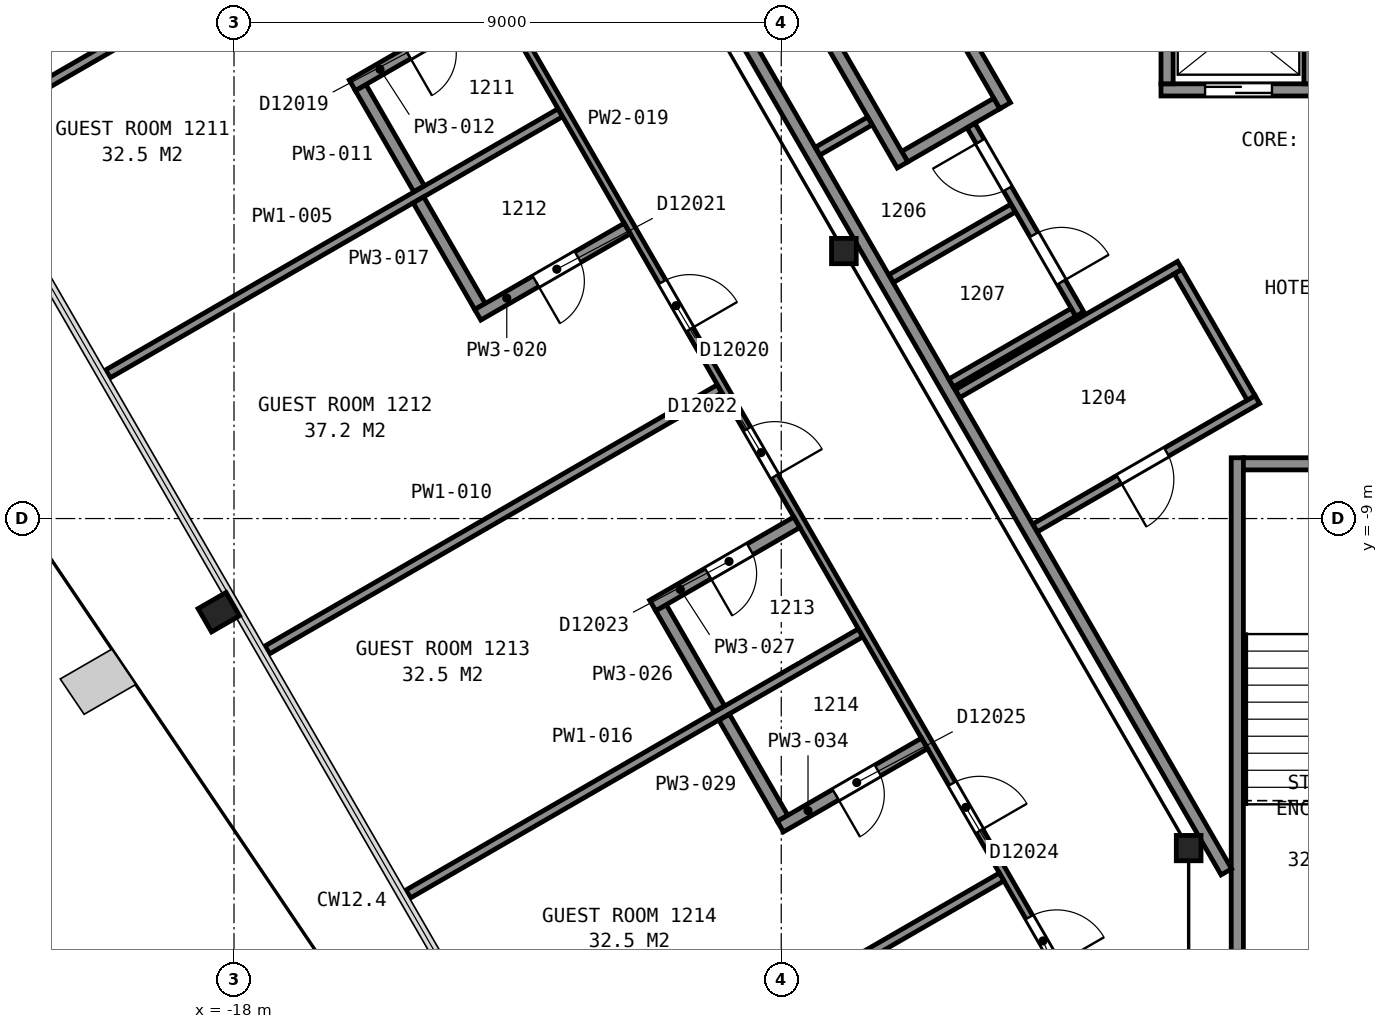
"""IFC4 building model, lengths in metres.
Left out: names, types, materials, properties, quantities, classifications, styles, units other than length and angle.
Written with IfcOpenShell. Run it as: python <this file> out.ifc"""

import sys

from ifc_helpers import new_model, si_unit, direction, frame, frame_2d, origin, origin_2d, place, context, subcontext, project, spatial, rectangle, i_section, extrude, element, fill, save


model = new_model("IFC4")
c1 = context("Model", 3, precision=1e-05, world=origin(), true_north=direction((0.0, 1.0)))
c2 = subcontext(c1, "Body", "Model", "MODEL_VIEW")
j1 = project(units=[si_unit("LENGTHUNIT", "METRE"), si_unit("PLANEANGLEUNIT", "RADIAN")], contexts=[c1])
p1 = place(None, origin())
s1 = spatial("IfcSite", under=j1, at=p1, CompositionType="ELEMENT")
p2 = place(p1, origin())
s2 = spatial("IfcBuilding", under=s1, at=p2, CompositionType="ELEMENT")
p3 = place(p2, frame((0.0, 0.0, 58.4)))
s3 = spatial("IfcBuildingStorey", under=s2, at=p3, CompositionType="ELEMENT", Elevation=58.4)
p4 = place(p3, frame((-18.25, -10.54, 0.0), z_axis=(0.0, 0.0, 1.0), x_axis=(-0.5, 0.866025403784, 0.0)))
e1 = element("IfcColumn", 1, at=p4, inside=s3, PredefinedType="COLUMN", context=c2, shape_type="SweptSolid", body=[
    extrude(i_section(OverallWidth=0.442, OverallDepth=0.531, WebThickness=0.066, FlangeThickness=0.106, FilletRadius=0.015, at=origin_2d()), origin(), (0.0, 0.0, 1.0), 3.575),
])
for number, where, z_axis, x_axis in (
    (2, (-7.97, -4.6, 0.0), (0.0, 0.0, 1.0), (1.0, 0.0, 0.0)),
    (3, (-2.3, -14.42, 0.0), (0.0, 0.0, 1.0), (1.0, 0.0, 0.0)),
):
    element("IfcColumn", number, at=place(p3, frame(where, z_axis=z_axis, x_axis=x_axis)), inside=s3, PredefinedType="COLUMN", context=c2, shape_type="SweptSolid", body=[
        extrude(i_section(OverallWidth=0.406, OverallDepth=0.417, WebThickness=0.03, FlangeThickness=0.048, FilletRadius=0.015, at=origin_2d()), origin(), (0.0, 0.0, 1.0), 3.6),
    ])
p5 = place(p3, frame((-1.5, -8.0, 0.0), z_axis=(0.0, 0.0, 1.0), x_axis=(0.0, -1.0, 0.0)))
e4 = element("IfcWall", 4, at=p5, inside=s3, PredefinedType="PARTITIONING", context=c2, shape_type="SweptSolid", body=[
    extrude(rectangle(XDim=12.0, YDim=0.2, at=frame_2d((6.0, 0.0))), origin(), (0.0, 0.0, 1.0), 3.35),
])
p6 = place(p3, frame((-1.4, -8.1, 0.0), z_axis=(0.0, 0.0, 1.0), x_axis=(1.0, 0.0, 0.0)))
e5 = element("IfcWall", 5, at=p6, inside=s3, PredefinedType="PARTITIONING", context=c2, shape_type="SweptSolid", body=[
    extrude(rectangle(XDim=2.8, YDim=0.2, at=frame_2d((1.4, 0.0))), origin(), (0.0, 0.0, 1.0), 3.35),
])
p7 = place(p3, frame((-2.755, -1.95, 0.0), z_axis=(0.0, 0.0, 1.0), x_axis=(1.0, 0.0, 0.0)))
e6 = element("IfcWall", 6, at=p7, inside=s3, PredefinedType="PARTITIONING", context=c2, shape_type="SweptSolid", body=[
    extrude(rectangle(XDim=2.55, YDim=0.2, at=frame_2d((1.275, 0.0))), origin(), (0.0, 0.0, 1.0), 3.6),
])
p8 = place(p7, frame((0.725, 0.0, 0.0)))
e7 = element("IfcOpeningElement", 7, at=p8, cuts=e6, PredefinedType="OPENING", context=c2, shape_type="SweptSolid", body=[
    extrude(rectangle(XDim=1.1, YDim=2.1, at=frame_2d((0.55, 1.05))), frame((0.0, 0.11, 0.0), z_axis=(0.0, -1.0, 0.0), x_axis=(1.0, 0.0, 0.0)), (0.0, 0.0, 1.0), 0.22),
])
for number, where, z_axis, x_axis in (
    (8, (-6.97, -3.048, 0.0), (0.0, 0.0, 1.0), (0.866, 0.5, 0.0)),
    (9, (-0.305, -1.85, 0.0), (0.0, 0.0, 1.0), (0.0, 1.0, 0.0)),
    (10, (-2.655, -1.85, 0.0), (0.0, 0.0, 1.0), (0.0, 1.0, 0.0)),
):
    element("IfcWall", number, at=place(p3, frame(where, z_axis=z_axis, x_axis=x_axis)), inside=s3, PredefinedType="PARTITIONING", context=c2, shape_type="SweptSolid", body=[
        extrude(rectangle(XDim=1.75, YDim=0.2, at=frame_2d((0.875, 0.0))), origin(), (0.0, 0.0, 1.0), 3.6),
    ])
p9 = place(p3, frame((-5.318, -2.21, 0.0), z_axis=(0.0, 0.0, 1.0), x_axis=(-0.499938297808, 0.866061024631, 0.0)))
e11 = element("IfcWall", 11, at=p9, inside=s3, PredefinedType="PARTITIONING", context=c2, shape_type="SweptSolid", body=[
    extrude(rectangle(XDim=2.35, YDim=0.2, at=frame_2d((1.175, 0.0))), origin(), (0.0, 0.0, 1.0), 3.6),
])
p10 = place(p3, frame((-7.006, -3.185, 0.0), z_axis=(0.0, 0.0, 1.0), x_axis=(-0.499990435942, 0.866030925526, 0.0)))
e12 = element("IfcWall", 12, at=p10, inside=s3, PredefinedType="PARTITIONING", context=c2, shape_type="SweptSolid", body=[
    extrude(rectangle(XDim=2.55, YDim=0.2, at=frame_2d((1.275, 0.0))), origin(), (0.0, 0.0, 1.0), 3.6),
])
p11 = place(p3, frame((-13.664, 5.946, 0.0), z_axis=(0.0, 0.0, 1.0), x_axis=(0.499994327219, -0.866028678941, 0.0)))
e13 = element("IfcWall", 13, at=p11, inside=s3, PredefinedType="PARTITIONING", context=c2, shape_type="SweptSolid", body=[
    extrude(rectangle(XDim=23.968, YDim=0.2, at=frame_2d((11.984, 0.0))), origin(), (0.0, 0.0, 1.0), 3.35),
])
p12 = place(p3, frame((-8.402, -2.958, 0.0), z_axis=(0.0, 0.0, 1.0), x_axis=(0.866025935826, 0.499999078476, 0.0)))
e14 = element("IfcWall", 14, at=p12, inside=s3, PredefinedType="PARTITIONING", context=c2, shape_type="SweptSolid", body=[
    extrude(rectangle(XDim=0.993, YDim=0.15, at=frame_2d((0.497, 0.0))), origin(), (0.0, 0.0, 1.0), 3.35),
])
p13 = place(p3, frame((-7.192, -5.053, 0.0), z_axis=(0.0, 0.0, 1.0), x_axis=(0.865851878631, 0.500300434011, 0.0)))
e15 = element("IfcWall", 15, at=p13, inside=s3, PredefinedType="PARTITIONING", context=c2, shape_type="SweptSolid", body=[
    extrude(rectangle(XDim=2.315, YDim=0.15, at=frame_2d((1.158, 0.0))), origin(), (0.0, 0.0, 1.0), 3.35),
])
p14 = place(p3, frame((-6.206, -6.77, 0.0), z_axis=(0.0, 0.0, 1.0), x_axis=(0.865998469481, 0.500046648681, 0.0)))
e16 = element("IfcWall", 16, at=p14, inside=s3, PredefinedType="PARTITIONING", context=c2, shape_type="SweptSolid", body=[
    extrude(rectangle(XDim=2.325, YDim=0.15, at=frame_2d((1.163, 0.0))), origin(), (0.0, 0.0, 1.0), 3.35),
])
p15 = place(p3, frame((-6.1, -6.946, 0.0), z_axis=(0.0, 0.0, 1.0), x_axis=(0.866038200431, 0.499977834903, 0.0)))
e17 = element("IfcWall", 17, at=p15, inside=s3, PredefinedType="PARTITIONING", context=c2, shape_type="SweptSolid", body=[
    extrude(rectangle(XDim=4.22, YDim=0.15, at=frame_2d((2.11, 0.0))), origin(), (0.0, 0.0, 1.0), 3.35),
])
p16 = place(p3, frame((-4.091, -5.635, 0.0), z_axis=(0.0, 0.0, 1.0), x_axis=(-0.499948934428, 0.866054884499, 0.0)))
e18 = element("IfcWall", 18, at=p16, inside=s3, PredefinedType="PARTITIONING", context=c2, shape_type="SweptSolid", body=[
    extrude(rectangle(XDim=3.577, YDim=0.15, at=frame_2d((1.789, 0.0))), origin(), (0.0, 0.0, 1.0), 3.35),
])
p17 = place(p16, frame((2.377, 0.0, 0.0)))
e19 = element("IfcOpeningElement", 19, at=p17, cuts=e18, PredefinedType="OPENING", context=c2, shape_type="SweptSolid", body=[
    extrude(rectangle(XDim=0.9, YDim=2.1, at=frame_2d((0.45, 1.05))), frame((0.0, 0.085, 0.0), z_axis=(0.0, -1.0, 0.0), x_axis=(1.0, 0.0, 0.0)), (0.0, 0.0, 1.0), 0.17),
])
p18 = place(p16, frame((0.605, 0.0, 0.0)))
e20 = element("IfcOpeningElement", 20, at=p18, cuts=e18, PredefinedType="OPENING", context=c2, shape_type="SweptSolid", body=[
    extrude(rectangle(XDim=0.9, YDim=2.1, at=frame_2d((0.45, 1.05))), frame((0.0, 0.085, 0.0), z_axis=(0.0, -1.0, 0.0), x_axis=(1.0, 0.0, 0.0)), (0.0, 0.0, 1.0), 0.17),
])
p19 = place(p3, frame((-4.825, -9.154, 0.0), z_axis=(0.0, 0.0, 1.0), x_axis=(0.866023738697, 0.500002884005, 0.0)))
e21 = element("IfcWall", 21, at=p19, inside=s3, PredefinedType="PARTITIONING", context=c2, shape_type="SweptSolid", body=[
    extrude(rectangle(XDim=4.22, YDim=0.15, at=frame_2d((2.11, 0.0))), origin(), (0.0, 0.0, 1.0), 3.35),
])
p20 = place(p19, frame((1.595, 0.0, 0.0)))
e22 = element("IfcOpeningElement", 22, at=p20, cuts=e21, PredefinedType="OPENING", context=c2, shape_type="SweptSolid", body=[
    extrude(rectangle(XDim=0.9, YDim=2.1, at=frame_2d((0.45, 1.05))), frame((0.0, 0.085, 0.0), z_axis=(0.0, -1.0, 0.0), x_axis=(1.0, 0.0, 0.0)), (0.0, 0.0, 1.0), 0.17),
])
p21 = place(p3, frame((-2.472, -4.938, 0.0), z_axis=(0.0, 0.0, 1.0), x_axis=(0.500045362686, -0.865999212041, 0.0)))
e23 = element("IfcWall", 23, at=p21, inside=s3, PredefinedType="PARTITIONING", context=c2, shape_type="SweptSolid", body=[
    extrude(rectangle(XDim=2.4, YDim=0.15, at=frame_2d((1.2, 0.0))), origin(), (0.0, 0.0, 1.0), 3.35),
])
p22 = place(p3, frame((-22.392, -2.605, 0.0), z_axis=(0.0, 0.0, 1.0), x_axis=(0.866031705461, 0.499989085017, 0.0)))
e24 = element("IfcWall", 24, at=p22, inside=s3, PredefinedType="PARTITIONING", context=c2, shape_type="SweptSolid", body=[
    extrude(rectangle(XDim=8.587, YDim=0.15, at=frame_2d((4.293, 0.0))), origin(), (0.0, 0.0, 1.0), 2.613),
])
p23 = place(p3, frame((-20.073, -6.621, 0.0), z_axis=(0.0, 0.0, 1.0), x_axis=(0.866029425019, 0.499993034952, 0.0)))
e25 = element("IfcWall", 25, at=p23, inside=s3, PredefinedType="PARTITIONING", context=c2, shape_type="SweptSolid", body=[
    extrude(rectangle(XDim=8.591, YDim=0.15, at=frame_2d((4.296, 0.0))), origin(), (0.0, 0.0, 1.0), 2.613),
])
p24 = place(p3, frame((-17.453, -11.16, 0.0), z_axis=(0.0, 0.0, 1.0), x_axis=(0.866031705461, 0.499989085017, 0.0)))
e26 = element("IfcWall", 26, at=p24, inside=s3, PredefinedType="PARTITIONING", context=c2, shape_type="SweptSolid", body=[
    extrude(rectangle(XDim=8.587, YDim=0.15, at=frame_2d((4.293, 0.0))), origin(), (0.0, 0.0, 1.0), 2.613),
])
p25 = place(p3, frame((-15.917, -1.912, 0.0), z_axis=(0.0, 0.0, 1.0), x_axis=(0.499913221443, -0.866075499611, 0.0)))
e27 = element("IfcWall", 27, at=p25, inside=s3, PredefinedType="PARTITIONING", context=c2, shape_type="SweptSolid", body=[
    extrude(rectangle(XDim=1.92, YDim=0.2, at=frame_2d((0.96, 0.0))), origin(), (0.0, 0.0, 1.0), 2.613),
])
p26 = place(p3, frame((-13.688, -0.509, 0.0), z_axis=(0.0, 0.0, 1.0), x_axis=(-0.866012976267, -0.500021524473, 0.0)))
e28 = element("IfcWall", 28, at=p26, inside=s3, PredefinedType="PARTITIONING", context=c2, shape_type="SweptSolid", body=[
    extrude(rectangle(XDim=2.732, YDim=0.2, at=frame_2d((1.366, 0.0))), origin(), (0.0, 0.0, 1.0), 2.613),
])
p27 = place(p26, frame((0.882, 0.0, 0.0)))
e29 = element("IfcOpeningElement", 29, at=p27, cuts=e28, PredefinedType="OPENING", context=c2, shape_type="SweptSolid", body=[
    extrude(rectangle(XDim=0.8, YDim=2.1, at=frame_2d((0.4, 1.05))), frame((0.0, 0.11, 0.0), z_axis=(0.0, -1.0, 0.0), x_axis=(1.0, 0.0, 0.0)), (0.0, 0.0, 1.0), 0.22),
])
p28 = place(p3, frame((-15.135, -15.175, 0.0), z_axis=(0.0, 0.0, 1.0), x_axis=(0.866024224461, 0.500002042643, 0.0)))
e30 = element("IfcWall", 30, at=p28, inside=s3, PredefinedType="PARTITIONING", context=c2, shape_type="SweptSolid", body=[
    extrude(rectangle(XDim=8.592, YDim=0.15, at=frame_2d((4.296, 0.0))), origin(), (0.0, 0.0, 1.0), 2.613),
])
p29 = place(p3, frame((-14.967, -3.759, 0.0), z_axis=(0.0, 0.0, 1.0), x_axis=(0.500042536776, -0.866000843773, 0.0)))
e31 = element("IfcWall", 31, at=p29, inside=s3, PredefinedType="PARTITIONING", context=c2, shape_type="SweptSolid", body=[
    extrude(rectangle(XDim=2.025, YDim=0.2, at=frame_2d((1.012, 0.0))), origin(), (0.0, 0.0, 1.0), 2.613),
])
p30 = place(p3, frame((-3.766, -17.558, 0.0), z_axis=(0.0, 0.0, 1.0), x_axis=(-0.500008349927, 0.866020582898, 0.0)))
e32 = element("IfcWall", 32, at=p30, inside=s3, PredefinedType="PARTITIONING", context=c2, shape_type="SweptSolid", body=[
    extrude(rectangle(XDim=22.496, YDim=0.125, at=frame_2d((11.248, 0.0))), origin(), (0.0, 0.0, 1.0), 2.613),
])
p31 = place(p30, frame((20.563, 0.0, 0.0)))
e33 = element("IfcOpeningElement", 33, at=p31, cuts=e32, PredefinedType="OPENING", context=c2, shape_type="SweptSolid", body=[
    extrude(rectangle(XDim=0.9, YDim=2.1, at=frame_2d((0.45, 1.05))), frame((0.0, 0.073, 0.0), z_axis=(0.0, -1.0, 0.0), x_axis=(1.0, 0.0, 0.0)), (0.0, 0.0, 1.0), 0.145),
])
p32 = place(p30, frame((13.476, 0.0, 0.0)))
e34 = element("IfcOpeningElement", 34, at=p32, cuts=e32, PredefinedType="OPENING", context=c2, shape_type="SweptSolid", body=[
    extrude(rectangle(XDim=0.9, YDim=2.1, at=frame_2d((0.45, 1.05))), frame((0.0, 0.073, 0.0), z_axis=(0.0, -1.0, 0.0), x_axis=(1.0, 0.0, 0.0)), (0.0, 0.0, 1.0), 0.145),
])
p33 = place(p30, frame((10.684, 0.0, 0.0)))
e35 = element("IfcOpeningElement", 35, at=p33, cuts=e32, PredefinedType="OPENING", context=c2, shape_type="SweptSolid", body=[
    extrude(rectangle(XDim=0.9, YDim=2.1, at=frame_2d((0.45, 1.05))), frame((0.0, 0.073, 0.0), z_axis=(0.0, -1.0, 0.0), x_axis=(1.0, 0.0, 0.0)), (0.0, 0.0, 1.0), 0.145),
])
p34 = place(p30, frame((3.948, 0.0, 0.0)))
e36 = element("IfcOpeningElement", 36, at=p34, cuts=e32, PredefinedType="OPENING", context=c2, shape_type="SweptSolid", body=[
    extrude(rectangle(XDim=0.9, YDim=2.1, at=frame_2d((0.45, 1.05))), frame((0.0, 0.073, 0.0), z_axis=(0.0, -1.0, 0.0), x_axis=(1.0, 0.0, 0.0)), (0.0, 0.0, 1.0), 0.145),
])
p35 = place(p30, frame((1.411, 0.0, 0.0)))
e37 = element("IfcOpeningElement", 37, at=p35, cuts=e32, PredefinedType="OPENING", context=c2, shape_type="SweptSolid", body=[
    extrude(rectangle(XDim=0.9, YDim=2.1, at=frame_2d((0.45, 1.05))), frame((0.0, 0.073, 0.0), z_axis=(0.0, -1.0, 0.0), x_axis=(1.0, 0.0, 0.0)), (0.0, 0.0, 1.0), 0.145),
])
p36 = place(p3, frame((-13.991, -5.649, 0.0), z_axis=(0.0, 0.0, 1.0), x_axis=(0.866048046904, 0.499960778915, 0.0)))
e38 = element("IfcWall", 38, at=p36, inside=s3, PredefinedType="PARTITIONING", context=c2, shape_type="SweptSolid", body=[
    extrude(rectangle(XDim=2.838, YDim=0.2, at=frame_2d((1.419, 0.0))), origin(), (0.0, 0.0, 1.0), 2.613),
])
p37 = place(p36, frame((1.1, 0.0, 0.0)))
e39 = element("IfcOpeningElement", 39, at=p37, cuts=e38, PredefinedType="OPENING", context=c2, shape_type="SweptSolid", body=[
    extrude(rectangle(XDim=0.8, YDim=2.1, at=frame_2d((0.4, 1.05))), frame((0.0, 0.11, 0.0), z_axis=(0.0, -1.0, 0.0), x_axis=(1.0, 0.0, 0.0)), (0.0, 0.0, 1.0), 0.22),
])
p38 = place(p3, frame((-12.816, -19.191, 0.0), z_axis=(0.0, 0.0, 1.0), x_axis=(0.866034625887, 0.499984026509, 0.0)))
e40 = element("IfcWall", 40, at=p38, inside=s3, PredefinedType="PARTITIONING", context=c2, shape_type="SweptSolid", body=[
    extrude(rectangle(XDim=8.591, YDim=0.15, at=frame_2d((4.295, 0.0))), origin(), (0.0, 0.0, 1.0), 2.613),
])
p39 = place(p3, frame((-10.978, -10.467, 0.0), z_axis=(0.0, 0.0, 1.0), x_axis=(0.499832553123, -0.866122057702, 0.0)))
e41 = element("IfcWall", 41, at=p39, inside=s3, PredefinedType="PARTITIONING", context=c2, shape_type="SweptSolid", body=[
    extrude(rectangle(XDim=1.92, YDim=0.2, at=frame_2d((0.96, 0.0))), origin(), (0.0, 0.0, 1.0), 2.613),
])
p40 = place(p3, frame((-8.744, -9.061, 0.0), z_axis=(0.0, 0.0, 1.0), x_axis=(-0.866005850709, -0.50003386539, 0.0)))
e42 = element("IfcWall", 42, at=p40, inside=s3, PredefinedType="PARTITIONING", context=c2, shape_type="SweptSolid", body=[
    extrude(rectangle(XDim=2.737, YDim=0.2, at=frame_2d((1.369, 0.0))), origin(), (0.0, 0.0, 1.0), 2.613),
])
p41 = place(p40, frame((0.887, 0.0, 0.0)))
e43 = element("IfcOpeningElement", 43, at=p41, cuts=e42, PredefinedType="OPENING", context=c2, shape_type="SweptSolid", body=[
    extrude(rectangle(XDim=0.8, YDim=2.1, at=frame_2d((0.4, 1.05))), frame((0.0, 0.11, 0.0), z_axis=(0.0, -1.0, 0.0), x_axis=(1.0, 0.0, 0.0)), (0.0, 0.0, 1.0), 0.22),
])
p42 = place(p3, frame((-9.938, -12.268, 0.0), z_axis=(0.0, 0.0, 1.0), x_axis=(0.500269123289, -0.865869969617, 0.0)))
e44 = element("IfcWall", 44, at=p42, inside=s3, PredefinedType="PARTITIONING", context=c2, shape_type="SweptSolid", body=[
    extrude(rectangle(XDim=1.92, YDim=0.2, at=frame_2d((0.96, 0.0))), origin(), (0.0, 0.0, 1.0), 2.613),
])
p43 = place(p3, frame((-9.015, -14.067, 0.0), z_axis=(0.0, 0.0, 1.0), x_axis=(0.866028150195, 0.499995243048, 0.0)))
e45 = element("IfcWall", 45, at=p43, inside=s3, PredefinedType="PARTITIONING", context=c2, shape_type="SweptSolid", body=[
    extrude(rectangle(XDim=2.737, YDim=0.2, at=frame_2d((1.369, 0.0))), origin(), (0.0, 0.0, 1.0), 2.613),
])
p44 = place(p43, frame((1.05, 0.0, 0.0)))
e46 = element("IfcOpeningElement", 46, at=p44, cuts=e45, PredefinedType="OPENING", context=c2, shape_type="SweptSolid", body=[
    extrude(rectangle(XDim=0.8, YDim=2.1, at=frame_2d((0.4, 1.05))), frame((0.0, 0.11, 0.0), z_axis=(0.0, -1.0, 0.0), x_axis=(1.0, 0.0, 0.0)), (0.0, 0.0, 1.0), 0.22),
])
p45 = place(p8, origin())
e47 = element("IfcDoor", 47, at=p45, inside=s3, OperationType="SLIDING_TO_RIGHT", PredefinedType="DOOR", context=c2, shape_type="SweptSolid", body=[
    extrude(rectangle(XDim=1.1, YDim=2.1, at=frame_2d((0.55, 1.05))), frame((0.0, 0.025, 0.0), z_axis=(0.0, -1.0, 0.0), x_axis=(1.0, 0.0, 0.0)), (0.0, 0.0, 1.0), 0.05),
])
fill(e7, e47)
p46 = place(p17, origin())
e48 = element("IfcDoor", 48, at=p46, inside=s3, OperationType="SINGLE_SWING_RIGHT", PredefinedType="DOOR", context=c2, shape_type="SweptSolid", body=[
    extrude(rectangle(XDim=0.9, YDim=2.1, at=frame_2d((0.45, 1.05))), frame((0.0, 0.025, 0.0), z_axis=(0.0, -1.0, 0.0), x_axis=(1.0, 0.0, 0.0)), (0.0, 0.0, 1.0), 0.05),
])
fill(e19, e48)
p47 = place(p18, origin())
e49 = element("IfcDoor", 49, at=p47, inside=s3, OperationType="SINGLE_SWING_LEFT", PredefinedType="DOOR", context=c2, shape_type="SweptSolid", body=[
    extrude(rectangle(XDim=0.9, YDim=2.1, at=frame_2d((0.45, 1.05))), frame((0.0, 0.025, 0.0), z_axis=(0.0, -1.0, 0.0), x_axis=(1.0, 0.0, 0.0)), (0.0, 0.0, 1.0), 0.05),
])
fill(e20, e49)
p48 = place(p20, origin())
e50 = element("IfcDoor", 50, at=p48, inside=s3, OperationType="SINGLE_SWING_LEFT", PredefinedType="DOOR", context=c2, shape_type="SweptSolid", body=[
    extrude(rectangle(XDim=0.9, YDim=2.1, at=frame_2d((0.45, 1.05))), frame((0.0, 0.025, 0.0), z_axis=(0.0, -1.0, 0.0), x_axis=(1.0, 0.0, 0.0)), (0.0, 0.0, 1.0), 0.05),
])
fill(e22, e50)
p49 = place(p27, origin())
e51 = element("IfcDoor", 51, at=p49, inside=s3, OperationType="SINGLE_SWING_RIGHT", PredefinedType="DOOR", context=c2, shape_type="SweptSolid", body=[
    extrude(rectangle(XDim=0.8, YDim=2.1, at=frame_2d((0.4, 1.05))), frame((0.0, 0.025, 0.0), z_axis=(0.0, -1.0, 0.0), x_axis=(1.0, 0.0, 0.0)), (0.0, 0.0, 1.0), 0.05),
])
fill(e29, e51)
p50 = place(p32, origin())
e52 = element("IfcDoor", 52, at=p50, inside=s3, OperationType="SINGLE_SWING_LEFT", PredefinedType="DOOR", context=c2, shape_type="SweptSolid", body=[
    extrude(rectangle(XDim=0.9, YDim=2.1, at=frame_2d((0.45, 1.05))), frame((0.0, 0.025, 0.0), z_axis=(0.0, -1.0, 0.0), x_axis=(1.0, 0.0, 0.0)), (0.0, 0.0, 1.0), 0.05),
])
fill(e34, e52)
p51 = place(p33, origin())
e53 = element("IfcDoor", 53, at=p51, inside=s3, OperationType="SINGLE_SWING_LEFT", PredefinedType="DOOR", context=c2, shape_type="SweptSolid", body=[
    extrude(rectangle(XDim=0.9, YDim=2.1, at=frame_2d((0.45, 1.05))), frame((0.0, 0.025, 0.0), z_axis=(0.0, -1.0, 0.0), x_axis=(1.0, 0.0, 0.0)), (0.0, 0.0, 1.0), 0.05),
])
fill(e35, e53)
p52 = place(p34, origin())
e54 = element("IfcDoor", 54, at=p52, inside=s3, OperationType="SINGLE_SWING_LEFT", PredefinedType="DOOR", context=c2, shape_type="SweptSolid", body=[
    extrude(rectangle(XDim=0.9, YDim=2.1, at=frame_2d((0.45, 1.05))), frame((0.0, 0.025, 0.0), z_axis=(0.0, -1.0, 0.0), x_axis=(1.0, 0.0, 0.0)), (0.0, 0.0, 1.0), 0.05),
])
fill(e36, e54)
p53 = place(p35, origin())
e55 = element("IfcDoor", 55, at=p53, inside=s3, OperationType="SINGLE_SWING_LEFT", PredefinedType="DOOR", context=c2, shape_type="SweptSolid", body=[
    extrude(rectangle(XDim=0.9, YDim=2.1, at=frame_2d((0.45, 1.05))), frame((0.0, 0.025, 0.0), z_axis=(0.0, -1.0, 0.0), x_axis=(1.0, 0.0, 0.0)), (0.0, 0.0, 1.0), 0.05),
])
fill(e37, e55)
p54 = place(p37, origin())
e56 = element("IfcDoor", 56, at=p54, inside=s3, OperationType="SINGLE_SWING_LEFT", PredefinedType="DOOR", context=c2, shape_type="SweptSolid", body=[
    extrude(rectangle(XDim=0.8, YDim=2.1, at=frame_2d((0.4, 1.05))), frame((0.0, 0.025, 0.0), z_axis=(0.0, -1.0, 0.0), x_axis=(1.0, 0.0, 0.0)), (0.0, 0.0, 1.0), 0.05),
])
fill(e39, e56)
p55 = place(p41, origin())
e57 = element("IfcDoor", 57, at=p55, inside=s3, OperationType="SINGLE_SWING_RIGHT", PredefinedType="DOOR", context=c2, shape_type="SweptSolid", body=[
    extrude(rectangle(XDim=0.8, YDim=2.1, at=frame_2d((0.4, 1.05))), frame((0.0, 0.025, 0.0), z_axis=(0.0, -1.0, 0.0), x_axis=(1.0, 0.0, 0.0)), (0.0, 0.0, 1.0), 0.05),
])
fill(e43, e57)
p56 = place(p44, origin())
e58 = element("IfcDoor", 58, at=p56, inside=s3, OperationType="SINGLE_SWING_LEFT", PredefinedType="DOOR", context=c2, shape_type="SweptSolid", body=[
    extrude(rectangle(XDim=0.8, YDim=2.1, at=frame_2d((0.4, 1.05))), frame((0.0, 0.025, 0.0), z_axis=(0.0, -1.0, 0.0), x_axis=(1.0, 0.0, 0.0)), (0.0, 0.0, 1.0), 0.05),
])
fill(e46, e58)
save(model, sys.argv[1])
